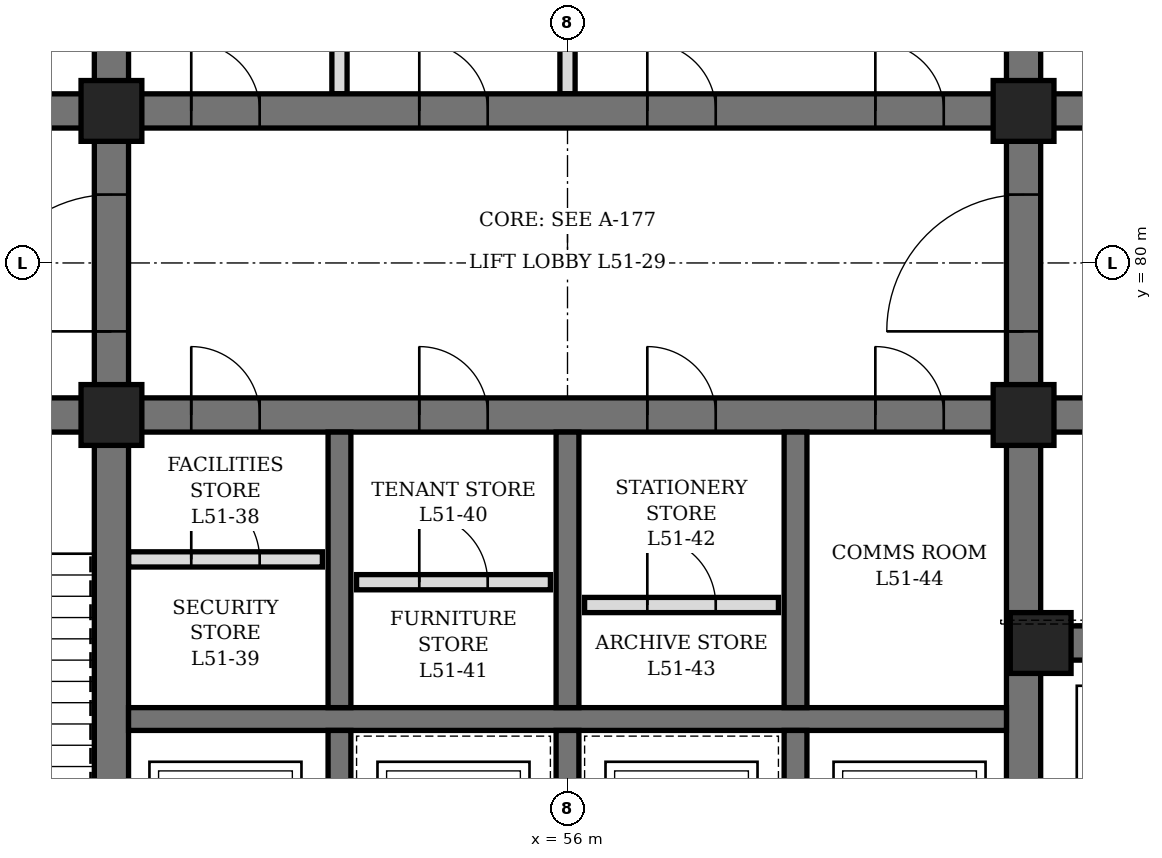
"""IFC4 building model, lengths in metres.
Left out: names, types, materials, properties, quantities, classifications, styles, units other than length and angle.
Written with IfcOpenShell. Run it as: python <this file> out.ifc"""

import sys

from ifc_helpers import new_model, si_unit, direction, frame, frame_2d, origin, origin_2d, place, context, subcontext, project, spatial, rectangle, hollow_rectangle, extrude, element, fill, save


model = new_model("IFC4")
c1 = context("Model", 3, precision=1e-05, world=origin(), true_north=direction((0.0, 1.0)))
c2 = subcontext(c1, "Body", "Model", "MODEL_VIEW")
j1 = project(units=[si_unit("LENGTHUNIT", "METRE"), si_unit("PLANEANGLEUNIT", "RADIAN")], contexts=[c1])
p1 = place(None, origin())
s1 = spatial("IfcSite", under=j1, at=p1, CompositionType="ELEMENT")
p2 = place(p1, origin())
s2 = spatial("IfcBuilding", under=s1, at=p2, CompositionType="ELEMENT")
p3 = place(p2, frame((0.0, 0.0, 227.5)))
s3 = spatial("IfcBuildingStorey", under=s2, at=p3, CompositionType="ELEMENT", Elevation=227.5)
p4 = place(p3, frame((50.0, 71.6, 0.0), z_axis=(0.0, 0.0, 1.0), x_axis=(0.0, 1.0, 0.0)))
e1 = element("IfcWall", 1, at=p4, inside=s3, PredefinedType="SHEAR", context=c2, shape_type="SweptSolid", body=[
    extrude(rectangle(XDim=16.8, YDim=0.45, at=frame_2d((8.4, 0.0))), origin(), (0.0, 0.0, 1.0), 4.2),
])
p5 = place(p4, frame((7.5, 0.0, 0.0)))
e2 = element("IfcOpeningElement", 2, at=p5, cuts=e1, PredefinedType="OPENING", context=c2, shape_type="SweptSolid", body=[
    extrude(rectangle(XDim=1.8, YDim=2.4, at=frame_2d((0.9, 1.2))), frame((0.0, 0.235, 0.0), z_axis=(0.0, -1.0, 0.0), x_axis=(1.0, 0.0, 0.0)), (0.0, 0.0, 1.0), 0.47),
])
p6 = place(p3, frame((62.0, 71.6, 0.0), z_axis=(0.0, 0.0, 1.0), x_axis=(0.0, 1.0, 0.0)))
e3 = element("IfcWall", 3, at=p6, inside=s3, PredefinedType="SHEAR", context=c2, shape_type="SweptSolid", body=[
    extrude(rectangle(XDim=16.8, YDim=0.45, at=frame_2d((8.4, 0.0))), origin(), (0.0, 0.0, 1.0), 4.2),
])
p7 = place(p6, frame((7.5, 0.0, 0.0)))
e4 = element("IfcOpeningElement", 4, at=p7, cuts=e3, PredefinedType="OPENING", context=c2, shape_type="SweptSolid", body=[
    extrude(rectangle(XDim=1.8, YDim=2.4, at=frame_2d((0.9, 1.2))), frame((0.0, 0.235, 0.0), z_axis=(0.0, -1.0, 0.0), x_axis=(1.0, 0.0, 0.0)), (0.0, 0.0, 1.0), 0.47),
])
p8 = place(p3, frame((44.6, 78.0, 0.0), z_axis=(0.0, 0.0, 1.0), x_axis=(1.0, 0.0, 0.0)))
e5 = element("IfcWall", 5, at=p8, inside=s3, PredefinedType="SHEAR", context=c2, shape_type="SweptSolid", body=[
    extrude(rectangle(XDim=5.175, YDim=0.45, at=frame_2d((2.587, 0.0))), origin(), (0.0, 0.0, 1.0), 4.2),
])
p9 = place(p8, frame((1.8, 0.0, 0.0)))
e6 = element("IfcOpeningElement", 6, at=p9, cuts=e5, PredefinedType="OPENING", context=c2, shape_type="SweptSolid", body=[
    extrude(rectangle(XDim=1.2, YDim=2.1, at=frame_2d((0.6, 1.05))), frame((0.0, 0.235, 0.0), z_axis=(0.0, -1.0, 0.0), x_axis=(1.0, 0.0, 0.0)), (0.0, 0.0, 1.0), 0.47),
])
p10 = place(p3, frame((44.6, 82.0, 0.0), z_axis=(0.0, 0.0, 1.0), x_axis=(1.0, 0.0, 0.0)))
e7 = element("IfcWall", 7, at=p10, inside=s3, PredefinedType="SHEAR", context=c2, shape_type="SweptSolid", body=[
    extrude(rectangle(XDim=5.175, YDim=0.45, at=frame_2d((2.587, 0.0))), origin(), (0.0, 0.0, 1.0), 4.2),
])
p11 = place(p10, frame((0.7, 0.0, 0.0)))
e8 = element("IfcOpeningElement", 8, at=p11, cuts=e7, PredefinedType="OPENING", context=c2, shape_type="SweptSolid", body=[
    extrude(rectangle(XDim=0.9, YDim=2.1, at=frame_2d((0.45, 1.05))), frame((0.0, 0.235, 0.0), z_axis=(0.0, -1.0, 0.0), x_axis=(1.0, 0.0, 0.0)), (0.0, 0.0, 1.0), 0.47),
])
p12 = place(p3, frame((62.225, 75.0, 0.0), z_axis=(0.0, 0.0, 1.0), x_axis=(1.0, 0.0, 0.0)))
e9 = element("IfcWall", 9, at=p12, inside=s3, PredefinedType="SHEAR", context=c2, shape_type="SweptSolid", body=[
    extrude(rectangle(XDim=5.175, YDim=0.45, at=frame_2d((2.587, 0.0))), origin(), (0.0, 0.0, 1.0), 4.2),
])
p13 = place(p12, frame((0.675, 0.0, 0.0)))
e10 = element("IfcOpeningElement", 10, at=p13, cuts=e9, PredefinedType="OPENING", context=c2, shape_type="SweptSolid", body=[
    extrude(rectangle(XDim=1.2, YDim=2.2, at=frame_2d((0.6, 1.1))), frame((0.0, 0.235, 0.0), z_axis=(0.0, -1.0, 0.0), x_axis=(1.0, 0.0, 0.0)), (0.0, 0.0, 1.0), 0.47),
])
p14 = place(p12, frame((3.425, 0.0, 0.0)))
e11 = element("IfcOpeningElement", 11, at=p14, cuts=e9, PredefinedType="OPENING", context=c2, shape_type="SweptSolid", body=[
    extrude(rectangle(XDim=1.2, YDim=2.2, at=frame_2d((0.6, 1.1))), frame((0.0, 0.235, 0.0), z_axis=(0.0, -1.0, 0.0), x_axis=(1.0, 0.0, 0.0)), (0.0, 0.0, 1.0), 0.47),
])
p15 = place(p3, frame((62.225, 78.0, 0.0), z_axis=(0.0, 0.0, 1.0), x_axis=(1.0, 0.0, 0.0)))
e12 = element("IfcWall", 12, at=p15, inside=s3, PredefinedType="SHEAR", context=c2, shape_type="SweptSolid", body=[
    extrude(rectangle(XDim=5.175, YDim=0.45, at=frame_2d((2.587, 0.0))), origin(), (0.0, 0.0, 1.0), 4.2),
])
p16 = place(p15, frame((2.175, 0.0, 0.0)))
e13 = element("IfcOpeningElement", 13, at=p16, cuts=e12, PredefinedType="OPENING", context=c2, shape_type="SweptSolid", body=[
    extrude(rectangle(XDim=1.2, YDim=2.1, at=frame_2d((0.6, 1.05))), frame((0.0, 0.235, 0.0), z_axis=(0.0, -1.0, 0.0), x_axis=(1.0, 0.0, 0.0)), (0.0, 0.0, 1.0), 0.47),
])
p17 = place(p3, frame((62.225, 82.0, 0.0), z_axis=(0.0, 0.0, 1.0), x_axis=(1.0, 0.0, 0.0)))
e14 = element("IfcWall", 14, at=p17, inside=s3, PredefinedType="SHEAR", context=c2, shape_type="SweptSolid", body=[
    extrude(rectangle(XDim=5.175, YDim=0.45, at=frame_2d((2.587, 0.0))), origin(), (0.0, 0.0, 1.0), 4.2),
])
p18 = place(p17, frame((2.175, 0.0, 0.0)))
e15 = element("IfcOpeningElement", 15, at=p18, cuts=e14, PredefinedType="OPENING", context=c2, shape_type="SweptSolid", body=[
    extrude(rectangle(XDim=1.2, YDim=2.1, at=frame_2d((0.6, 1.05))), frame((0.0, 0.235, 0.0), z_axis=(0.0, -1.0, 0.0), x_axis=(1.0, 0.0, 0.0)), (0.0, 0.0, 1.0), 0.47),
])
p19 = place(p3, frame((50.225, 78.0, 0.0), z_axis=(0.0, 0.0, 1.0), x_axis=(1.0, 0.0, 0.0)))
e16 = element("IfcWall", 16, at=p19, inside=s3, PredefinedType="SHEAR", context=c2, shape_type="SweptSolid", body=[
    extrude(rectangle(XDim=11.55, YDim=0.45, at=frame_2d((5.775, 0.0))), origin(), (0.0, 0.0, 1.0), 4.2),
])
p20 = place(p19, frame((0.825, 0.0, 0.0)))
e17 = element("IfcOpeningElement", 17, at=p20, cuts=e16, PredefinedType="OPENING", context=c2, shape_type="SweptSolid", body=[
    extrude(rectangle(XDim=0.9, YDim=2.1, at=frame_2d((0.45, 1.05))), frame((0.0, 0.235, 0.0), z_axis=(0.0, -1.0, 0.0), x_axis=(1.0, 0.0, 0.0)), (0.0, 0.0, 1.0), 0.47),
])
p21 = place(p19, frame((3.825, 0.0, 0.0)))
e18 = element("IfcOpeningElement", 18, at=p21, cuts=e16, PredefinedType="OPENING", context=c2, shape_type="SweptSolid", body=[
    extrude(rectangle(XDim=0.9, YDim=2.1, at=frame_2d((0.45, 1.05))), frame((0.0, 0.235, 0.0), z_axis=(0.0, -1.0, 0.0), x_axis=(1.0, 0.0, 0.0)), (0.0, 0.0, 1.0), 0.47),
])
p22 = place(p19, frame((6.825, 0.0, 0.0)))
e19 = element("IfcOpeningElement", 19, at=p22, cuts=e16, PredefinedType="OPENING", context=c2, shape_type="SweptSolid", body=[
    extrude(rectangle(XDim=0.9, YDim=2.1, at=frame_2d((0.45, 1.05))), frame((0.0, 0.235, 0.0), z_axis=(0.0, -1.0, 0.0), x_axis=(1.0, 0.0, 0.0)), (0.0, 0.0, 1.0), 0.47),
])
p23 = place(p19, frame((9.825, 0.0, 0.0)))
e20 = element("IfcOpeningElement", 20, at=p23, cuts=e16, PredefinedType="OPENING", context=c2, shape_type="SweptSolid", body=[
    extrude(rectangle(XDim=0.9, YDim=2.1, at=frame_2d((0.45, 1.05))), frame((0.0, 0.235, 0.0), z_axis=(0.0, -1.0, 0.0), x_axis=(1.0, 0.0, 0.0)), (0.0, 0.0, 1.0), 0.47),
])
p24 = place(p3, frame((50.225, 82.0, 0.0), z_axis=(0.0, 0.0, 1.0), x_axis=(1.0, 0.0, 0.0)))
e21 = element("IfcWall", 21, at=p24, inside=s3, PredefinedType="SHEAR", context=c2, shape_type="SweptSolid", body=[
    extrude(rectangle(XDim=11.55, YDim=0.45, at=frame_2d((5.775, 0.0))), origin(), (0.0, 0.0, 1.0), 4.2),
])
p25 = place(p24, frame((0.825, 0.0, 0.0)))
e22 = element("IfcOpeningElement", 22, at=p25, cuts=e21, PredefinedType="OPENING", context=c2, shape_type="SweptSolid", body=[
    extrude(rectangle(XDim=0.9, YDim=2.1, at=frame_2d((0.45, 1.05))), frame((0.0, 0.235, 0.0), z_axis=(0.0, -1.0, 0.0), x_axis=(1.0, 0.0, 0.0)), (0.0, 0.0, 1.0), 0.47),
])
p26 = place(p24, frame((3.825, 0.0, 0.0)))
e23 = element("IfcOpeningElement", 23, at=p26, cuts=e21, PredefinedType="OPENING", context=c2, shape_type="SweptSolid", body=[
    extrude(rectangle(XDim=0.9, YDim=2.1, at=frame_2d((0.45, 1.05))), frame((0.0, 0.235, 0.0), z_axis=(0.0, -1.0, 0.0), x_axis=(1.0, 0.0, 0.0)), (0.0, 0.0, 1.0), 0.47),
])
p27 = place(p24, frame((6.825, 0.0, 0.0)))
e24 = element("IfcOpeningElement", 24, at=p27, cuts=e21, PredefinedType="OPENING", context=c2, shape_type="SweptSolid", body=[
    extrude(rectangle(XDim=0.9, YDim=2.1, at=frame_2d((0.45, 1.05))), frame((0.0, 0.235, 0.0), z_axis=(0.0, -1.0, 0.0), x_axis=(1.0, 0.0, 0.0)), (0.0, 0.0, 1.0), 0.47),
])
p28 = place(p24, frame((9.825, 0.0, 0.0)))
e25 = element("IfcOpeningElement", 25, at=p28, cuts=e21, PredefinedType="OPENING", context=c2, shape_type="SweptSolid", body=[
    extrude(rectangle(XDim=0.9, YDim=2.1, at=frame_2d((0.45, 1.05))), frame((0.0, 0.235, 0.0), z_axis=(0.0, -1.0, 0.0), x_axis=(1.0, 0.0, 0.0)), (0.0, 0.0, 1.0), 0.47),
])
p29 = place(p3, frame((50.225, 74.0, 0.0), z_axis=(0.0, 0.0, 1.0), x_axis=(1.0, 0.0, 0.0)))
e26 = element("IfcWall", 26, at=p29, inside=s3, PredefinedType="SHEAR", context=c2, shape_type="SweptSolid", body=[
    extrude(rectangle(XDim=11.55, YDim=0.3, at=frame_2d((5.775, 0.0))), origin(), (0.0, 0.0, 1.0), 4.2),
])
p30 = place(p3, frame((53.0, 71.6, 0.0), z_axis=(0.0, 0.0, 1.0), x_axis=(0.0, 1.0, 0.0)))
e27 = element("IfcWall", 27, at=p30, inside=s3, PredefinedType="SHEAR", context=c2, shape_type="SweptSolid", body=[
    extrude(rectangle(XDim=2.25, YDim=0.3, at=frame_2d((1.125, 0.0))), origin(), (0.0, 0.0, 1.0), 4.2),
])
p31 = place(p3, frame((53.0, 74.15, 0.0), z_axis=(0.0, 0.0, 1.0), x_axis=(0.0, 1.0, 0.0)))
e28 = element("IfcWall", 28, at=p31, inside=s3, PredefinedType="SHEAR", context=c2, shape_type="SweptSolid", body=[
    extrude(rectangle(XDim=3.625, YDim=0.3, at=frame_2d((1.812, 0.0))), origin(), (0.0, 0.0, 1.0), 4.2),
])
p32 = place(p3, frame((56.0, 71.6, 0.0), z_axis=(0.0, 0.0, 1.0), x_axis=(0.0, 1.0, 0.0)))
e29 = element("IfcWall", 29, at=p32, inside=s3, PredefinedType="SHEAR", context=c2, shape_type="SweptSolid", body=[
    extrude(rectangle(XDim=2.25, YDim=0.3, at=frame_2d((1.125, 0.0))), origin(), (0.0, 0.0, 1.0), 4.2),
])
p33 = place(p3, frame((56.0, 74.15, 0.0), z_axis=(0.0, 0.0, 1.0), x_axis=(0.0, 1.0, 0.0)))
e30 = element("IfcWall", 30, at=p33, inside=s3, PredefinedType="SHEAR", context=c2, shape_type="SweptSolid", body=[
    extrude(rectangle(XDim=3.625, YDim=0.3, at=frame_2d((1.812, 0.0))), origin(), (0.0, 0.0, 1.0), 4.2),
])
p34 = place(p3, frame((59.0, 71.6, 0.0), z_axis=(0.0, 0.0, 1.0), x_axis=(0.0, 1.0, 0.0)))
e31 = element("IfcWall", 31, at=p34, inside=s3, PredefinedType="SHEAR", context=c2, shape_type="SweptSolid", body=[
    extrude(rectangle(XDim=2.25, YDim=0.3, at=frame_2d((1.125, 0.0))), origin(), (0.0, 0.0, 1.0), 4.2),
])
p35 = place(p3, frame((59.0, 74.15, 0.0), z_axis=(0.0, 0.0, 1.0), x_axis=(0.0, 1.0, 0.0)))
e32 = element("IfcWall", 32, at=p35, inside=s3, PredefinedType="SHEAR", context=c2, shape_type="SweptSolid", body=[
    extrude(rectangle(XDim=3.625, YDim=0.3, at=frame_2d((1.812, 0.0))), origin(), (0.0, 0.0, 1.0), 4.2),
])
for number, where, z_axis, x_axis in (
    (33, (50.0, 78.0, 0.0), (0.0, 0.0, 1.0), (1.0, 0.0, 0.0)),
    (34, (50.0, 82.0, 0.0), (0.0, 0.0, 1.0), (1.0, 0.0, 0.0)),
    (35, (62.0, 78.0, 0.0), (0.0, 0.0, 1.0), (1.0, 0.0, 0.0)),
    (36, (62.0, 82.0, 0.0), (0.0, 0.0, 1.0), (1.0, 0.0, 0.0)),
    (37, (62.225, 75.0, 0.0), (0.0, 0.0, 1.0), (1.0, 0.0, 0.0)),
):
    element("IfcColumn", number, at=place(p3, frame(where, z_axis=z_axis, x_axis=x_axis)), inside=s3, PredefinedType="COLUMN", context=c2, shape_type="SweptSolid", body=[
        extrude(hollow_rectangle(XDim=0.8, YDim=0.8, WallThickness=0.1, at=origin_2d()), origin(), (0.0, 0.0, 1.0), 4.2),
    ])
p36 = place(p3, frame((50.225, 76.1, 0.0), z_axis=(0.0, 0.0, 1.0), x_axis=(1.0, 0.0, 0.0)))
e38 = element("IfcWall", 38, at=p36, inside=s3, PredefinedType="PARTITIONING", context=c2, shape_type="SweptSolid", body=[
    extrude(rectangle(XDim=2.55, YDim=0.2, at=frame_2d((1.275, 0.0))), origin(), (0.0, 0.0, 1.0), 4.04),
])
p37 = place(p36, frame((0.825, 0.0, 0.0)))
e39 = element("IfcOpeningElement", 39, at=p37, cuts=e38, PredefinedType="OPENING", context=c2, shape_type="SweptSolid", body=[
    extrude(rectangle(XDim=0.9, YDim=2.1, at=frame_2d((0.45, 1.05))), frame((0.0, 0.11, 0.0), z_axis=(0.0, -1.0, 0.0), x_axis=(1.0, 0.0, 0.0)), (0.0, 0.0, 1.0), 0.22),
])
p38 = place(p3, frame((53.225, 75.8, 0.0), z_axis=(0.0, 0.0, 1.0), x_axis=(1.0, 0.0, 0.0)))
e40 = element("IfcWall", 40, at=p38, inside=s3, PredefinedType="PARTITIONING", context=c2, shape_type="SweptSolid", body=[
    extrude(rectangle(XDim=2.55, YDim=0.2, at=frame_2d((1.275, 0.0))), origin(), (0.0, 0.0, 1.0), 4.04),
])
p39 = place(p38, frame((0.825, 0.0, 0.0)))
e41 = element("IfcOpeningElement", 41, at=p39, cuts=e40, PredefinedType="OPENING", context=c2, shape_type="SweptSolid", body=[
    extrude(rectangle(XDim=0.9, YDim=2.1, at=frame_2d((0.45, 1.05))), frame((0.0, 0.11, 0.0), z_axis=(0.0, -1.0, 0.0), x_axis=(1.0, 0.0, 0.0)), (0.0, 0.0, 1.0), 0.22),
])
p40 = place(p3, frame((56.225, 75.5, 0.0), z_axis=(0.0, 0.0, 1.0), x_axis=(1.0, 0.0, 0.0)))
e42 = element("IfcWall", 42, at=p40, inside=s3, PredefinedType="PARTITIONING", context=c2, shape_type="SweptSolid", body=[
    extrude(rectangle(XDim=2.55, YDim=0.2, at=frame_2d((1.275, 0.0))), origin(), (0.0, 0.0, 1.0), 4.04),
])
p41 = place(p40, frame((0.825, 0.0, 0.0)))
e43 = element("IfcOpeningElement", 43, at=p41, cuts=e42, PredefinedType="OPENING", context=c2, shape_type="SweptSolid", body=[
    extrude(rectangle(XDim=0.9, YDim=2.1, at=frame_2d((0.45, 1.05))), frame((0.0, 0.11, 0.0), z_axis=(0.0, -1.0, 0.0), x_axis=(1.0, 0.0, 0.0)), (0.0, 0.0, 1.0), 0.22),
])
p42 = place(p3, frame((53.0, 82.225, 0.0), z_axis=(0.0, 0.0, 1.0), x_axis=(0.0, 1.0, 0.0)))
e44 = element("IfcWall", 44, at=p42, inside=s3, PredefinedType="PARTITIONING", context=c2, shape_type="SweptSolid", body=[
    extrude(rectangle(XDim=3.55, YDim=0.2, at=frame_2d((1.775, 0.0))), origin(), (0.0, 0.0, 1.0), 4.04),
])
p43 = place(p3, frame((56.0, 82.225, 0.0), z_axis=(0.0, 0.0, 1.0), x_axis=(0.0, 1.0, 0.0)))
e45 = element("IfcWall", 45, at=p43, inside=s3, PredefinedType="PARTITIONING", context=c2, shape_type="SweptSolid", body=[
    extrude(rectangle(XDim=3.55, YDim=0.2, at=frame_2d((1.775, 0.0))), origin(), (0.0, 0.0, 1.0), 3.14),
])
p44 = place(p20, origin())
e46 = element("IfcDoor", 46, at=p44, inside=s3, OperationType="SINGLE_SWING_LEFT", PredefinedType="DOOR", context=c2, shape_type="SweptSolid", body=[
    extrude(rectangle(XDim=0.9, YDim=2.1, at=frame_2d((0.45, 1.05))), frame((0.0, 0.225, 0.0), z_axis=(0.0, -1.0, 0.0), x_axis=(1.0, 0.0, 0.0)), (0.0, 0.0, 1.0), 0.449),
])
fill(e17, e46)
p45 = place(p37, origin())
e47 = element("IfcDoor", 47, at=p45, inside=s3, OperationType="SINGLE_SWING_LEFT", PredefinedType="DOOR", context=c2, shape_type="SweptSolid", body=[
    extrude(rectangle(XDim=0.9, YDim=2.1, at=frame_2d((0.45, 1.05))), frame((0.0, 0.1, 0.0), z_axis=(0.0, -1.0, 0.0), x_axis=(1.0, 0.0, 0.0)), (0.0, 0.0, 1.0), 0.199),
])
fill(e39, e47)
p46 = place(p21, origin())
e48 = element("IfcDoor", 48, at=p46, inside=s3, OperationType="SINGLE_SWING_LEFT", PredefinedType="DOOR", context=c2, shape_type="SweptSolid", body=[
    extrude(rectangle(XDim=0.9, YDim=2.1, at=frame_2d((0.45, 1.05))), frame((0.0, 0.225, 0.0), z_axis=(0.0, -1.0, 0.0), x_axis=(1.0, 0.0, 0.0)), (0.0, 0.0, 1.0), 0.449),
])
fill(e18, e48)
p47 = place(p39, origin())
e49 = element("IfcDoor", 49, at=p47, inside=s3, OperationType="SINGLE_SWING_LEFT", PredefinedType="DOOR", context=c2, shape_type="SweptSolid", body=[
    extrude(rectangle(XDim=0.9, YDim=2.1, at=frame_2d((0.45, 1.05))), frame((0.0, 0.1, 0.0), z_axis=(0.0, -1.0, 0.0), x_axis=(1.0, 0.0, 0.0)), (0.0, 0.0, 1.0), 0.199),
])
fill(e41, e49)
p48 = place(p22, origin())
e50 = element("IfcDoor", 50, at=p48, inside=s3, OperationType="SINGLE_SWING_LEFT", PredefinedType="DOOR", context=c2, shape_type="SweptSolid", body=[
    extrude(rectangle(XDim=0.9, YDim=2.1, at=frame_2d((0.45, 1.05))), frame((0.0, 0.225, 0.0), z_axis=(0.0, -1.0, 0.0), x_axis=(1.0, 0.0, 0.0)), (0.0, 0.0, 1.0), 0.449),
])
fill(e19, e50)
p49 = place(p41, origin())
e51 = element("IfcDoor", 51, at=p49, inside=s3, OperationType="SINGLE_SWING_LEFT", PredefinedType="DOOR", context=c2, shape_type="SweptSolid", body=[
    extrude(rectangle(XDim=0.9, YDim=2.1, at=frame_2d((0.45, 1.05))), frame((0.0, 0.1, 0.0), z_axis=(0.0, -1.0, 0.0), x_axis=(1.0, 0.0, 0.0)), (0.0, 0.0, 1.0), 0.199),
])
fill(e43, e51)
p50 = place(p23, origin())
e52 = element("IfcDoor", 52, at=p50, inside=s3, OperationType="SINGLE_SWING_LEFT", PredefinedType="DOOR", context=c2, shape_type="SweptSolid", body=[
    extrude(rectangle(XDim=0.9, YDim=2.1, at=frame_2d((0.45, 1.05))), frame((0.0, 0.225, 0.0), z_axis=(0.0, -1.0, 0.0), x_axis=(1.0, 0.0, 0.0)), (0.0, 0.0, 1.0), 0.449),
])
fill(e20, e52)
p51 = place(p25, origin())
e53 = element("IfcDoor", 53, at=p51, inside=s3, OperationType="SINGLE_SWING_LEFT", PredefinedType="DOOR", context=c2, shape_type="SweptSolid", body=[
    extrude(rectangle(XDim=0.9, YDim=2.1, at=frame_2d((0.45, 1.05))), frame((0.0, 0.225, 0.0), z_axis=(0.0, -1.0, 0.0), x_axis=(1.0, 0.0, 0.0)), (0.0, 0.0, 1.0), 0.449),
])
fill(e22, e53)
p52 = place(p26, origin())
e54 = element("IfcDoor", 54, at=p52, inside=s3, OperationType="SINGLE_SWING_LEFT", PredefinedType="DOOR", context=c2, shape_type="SweptSolid", body=[
    extrude(rectangle(XDim=0.9, YDim=2.1, at=frame_2d((0.45, 1.05))), frame((0.0, 0.225, 0.0), z_axis=(0.0, -1.0, 0.0), x_axis=(1.0, 0.0, 0.0)), (0.0, 0.0, 1.0), 0.449),
])
fill(e23, e54)
p53 = place(p27, origin())
e55 = element("IfcDoor", 55, at=p53, inside=s3, OperationType="SINGLE_SWING_LEFT", PredefinedType="DOOR", context=c2, shape_type="SweptSolid", body=[
    extrude(rectangle(XDim=0.9, YDim=2.1, at=frame_2d((0.45, 1.05))), frame((0.0, 0.225, 0.0), z_axis=(0.0, -1.0, 0.0), x_axis=(1.0, 0.0, 0.0)), (0.0, 0.0, 1.0), 0.449),
])
fill(e24, e55)
p54 = place(p28, origin())
e56 = element("IfcDoor", 56, at=p54, inside=s3, OperationType="SINGLE_SWING_LEFT", PredefinedType="DOOR", context=c2, shape_type="SweptSolid", body=[
    extrude(rectangle(XDim=0.9, YDim=2.1, at=frame_2d((0.45, 1.05))), frame((0.0, 0.225, 0.0), z_axis=(0.0, -1.0, 0.0), x_axis=(1.0, 0.0, 0.0)), (0.0, 0.0, 1.0), 0.449),
])
fill(e25, e56)
p55 = place(p5, origin())
e57 = element("IfcDoor", 57, at=p55, inside=s3, OperationType="DOUBLE_DOOR_SINGLE_SWING", PredefinedType="DOOR", context=c2, shape_type="SweptSolid", body=[
    extrude(rectangle(XDim=1.8, YDim=2.4, at=frame_2d((0.9, 1.2))), frame((0.0, 0.225, 0.0), z_axis=(0.0, -1.0, 0.0), x_axis=(1.0, 0.0, 0.0)), (0.0, 0.0, 1.0), 0.449),
])
fill(e2, e57)
p56 = place(p7, origin())
e58 = element("IfcDoor", 58, at=p56, inside=s3, OperationType="DOUBLE_DOOR_SINGLE_SWING", PredefinedType="DOOR", context=c2, shape_type="SweptSolid", body=[
    extrude(rectangle(XDim=1.8, YDim=2.4, at=frame_2d((0.9, 1.2))), frame((0.0, 0.225, 0.0), z_axis=(0.0, -1.0, 0.0), x_axis=(1.0, 0.0, 0.0)), (0.0, 0.0, 1.0), 0.449),
])
fill(e4, e58)
save(model, sys.argv[1])
